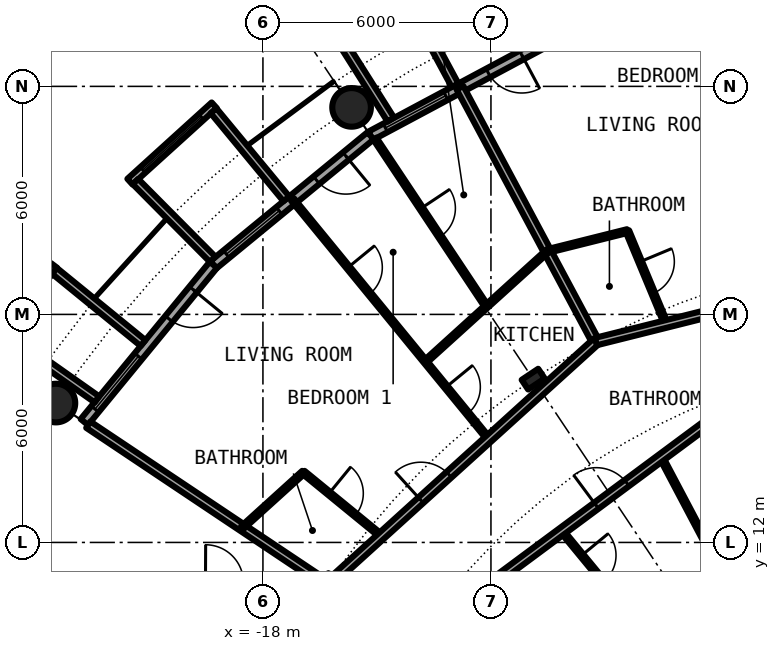
"""IFC4 building model, lengths in metres.
Left out: names, types, materials, properties, quantities, classifications, styles, units other than length and angle.
Written with IfcOpenShell. Run it as: python <this file> out.ifc"""

import sys

from ifc_helpers import new_model, si_unit, direction, frame, frame_2d, origin, origin_2d, place, context, subcontext, project, spatial, rectangle, circle, hollow_circle, i_section, extrude, element, fill, save


model = new_model("IFC4")
c1 = context("Model", 3, precision=1e-05, world=origin(), true_north=direction((0.0, 1.0)))
c2 = subcontext(c1, "Body", "Model", "MODEL_VIEW")
j1 = project(units=[si_unit("LENGTHUNIT", "METRE"), si_unit("PLANEANGLEUNIT", "RADIAN")], contexts=[c1])
p1 = place(None, origin())
s1 = spatial("IfcSite", under=j1, at=p1, CompositionType="ELEMENT")
p2 = place(p1, origin())
s2 = spatial("IfcBuilding", under=s1, at=p2, CompositionType="ELEMENT")
p3 = place(p2, frame((0.0, 0.0, 81.9)))
s3 = spatial("IfcBuildingStorey", under=s2, at=p3, CompositionType="ELEMENT", Elevation=81.9)
for number, where, z_axis, x_axis in (
    (1, (-15.667, 23.448, 0.0), (0.0, 0.0, 1.0), (1.0, 0.0, 0.0)),
    (2, (-23.448, 15.667, 0.0), (0.0, 0.0, 1.0), (1.0, 0.0, 0.0)),
):
    element("IfcColumn", number, at=place(p3, frame(where, z_axis=z_axis, x_axis=x_axis)), inside=s3, PredefinedType="COLUMN", context=c2, shape_type="SweptSolid", body=[
        extrude(hollow_circle(Radius=0.508, WallThickness=0.04, at=origin_2d()), origin(), (0.0, 0.0, 1.0), 3.05),
    ])
p4 = place(p3, frame((-10.889, 16.297, 0.0), z_axis=(0.0, 0.0, 1.0), x_axis=(-0.55557023302, 0.831469612303, 0.0)))
e3 = element("IfcColumn", 3, at=p4, inside=s3, PredefinedType="COLUMN", context=c2, shape_type="SweptSolid", body=[
    extrude(i_section(OverallWidth=0.306, OverallDepth=0.524, WebThickness=0.021, FlangeThickness=0.04, FilletRadius=0.027, at=origin_2d()), origin(), (0.0, 0.0, 1.0), 3.05),
])
p5 = place(p3, frame((-10.447, 25.222, 0.0), z_axis=(0.0, 0.0, 1.0), x_axis=(-0.881915646801, -0.471407246368, 0.0)))
e4 = element("IfcWall", 4, at=p5, inside=s3, PredefinedType="SOLIDWALL", context=c2, shape_type="SweptSolid", body=[
    extrude(rectangle(XDim=5.352, YDim=0.25, at=frame_2d((2.676, 0.0))), origin(), (0.0, 0.0, 1.0), 2.7),
])
p6 = place(p5, frame((0.841, 0.0, 0.0)))
e5 = element("IfcOpeningElement", 5, at=p6, cuts=e4, PredefinedType="OPENING", context=c2, shape_type="SweptSolid", body=[
    extrude(rectangle(XDim=1.0, YDim=2.2, at=frame_2d((0.5, 1.1))), frame((0.0, 0.135, 0.0), z_axis=(0.0, -1.0, 0.0), x_axis=(1.0, 0.0, 0.0)), (0.0, 0.0, 1.0), 0.27),
])
p7 = place(p5, frame((3.111, 0.0, 0.3)))
e6 = element("IfcOpeningElement", 6, at=p7, cuts=e4, PredefinedType="OPENING", context=c2, shape_type="SweptSolid", body=[
    extrude(rectangle(XDim=1.8, YDim=2.1, at=frame_2d((0.9, 1.05))), frame((0.0, 0.135, 0.0), z_axis=(0.0, -1.0, 0.0), x_axis=(1.0, 0.0, 0.0)), (0.0, 0.0, 1.0), 0.27),
])
p8 = place(p3, frame((-12.945, 24.029, -0.03), z_axis=(0.0, 0.0, 1.0), x_axis=(-0.474424310775, 0.88029629861, 0.0)))
e7 = element("IfcWall", 7, at=p8, inside=s3, PredefinedType="SOLIDWALL", context=c2, shape_type="SweptSolid", body=[
    extrude(rectangle(XDim=3.006, YDim=0.2, at=frame_2d((1.503, 0.0))), origin(), (0.0, 0.0, 1.0), 2.73),
])
p9 = place(p3, frame((-14.635, 23.126, -0.03), z_axis=(0.0, 0.0, 1.0), x_axis=(-0.534437802731, 0.845207805816, 0.0)))
e8 = element("IfcWall", 8, at=p9, inside=s3, PredefinedType="SOLIDWALL", context=c2, shape_type="SweptSolid", body=[
    extrude(rectangle(XDim=2.932, YDim=0.2, at=frame_2d((1.466, 0.0))), origin(), (0.0, 0.0, 1.0), 2.73),
])
p10 = place(p3, frame((-15.167, 22.699, 0.0), z_axis=(0.0, 0.0, 1.0), x_axis=(-0.773019449054, -0.634382322723, 0.0)))
e9 = element("IfcWall", 9, at=p10, inside=s3, PredefinedType="SOLIDWALL", context=c2, shape_type="SweptSolid", body=[
    extrude(rectangle(XDim=5.352, YDim=0.25, at=frame_2d((2.676, 0.0))), origin(), (0.0, 0.0, 1.0), 2.7),
])
p11 = place(p10, frame((0.841, 0.0, 0.0)))
e10 = element("IfcOpeningElement", 10, at=p11, cuts=e9, PredefinedType="OPENING", context=c2, shape_type="SweptSolid", body=[
    extrude(rectangle(XDim=1.0, YDim=2.2, at=frame_2d((0.5, 1.1))), frame((0.0, 0.135, 0.0), z_axis=(0.0, -1.0, 0.0), x_axis=(1.0, 0.0, 0.0)), (0.0, 0.0, 1.0), 0.27),
])
p12 = place(p10, frame((3.111, 0.0, 0.3)))
e11 = element("IfcOpeningElement", 11, at=p12, cuts=e9, PredefinedType="OPENING", context=c2, shape_type="SweptSolid", body=[
    extrude(rectangle(XDim=1.8, YDim=2.1, at=frame_2d((0.9, 1.05))), frame((0.0, 0.135, 0.0), z_axis=(0.0, -1.0, 0.0), x_axis=(1.0, 0.0, 0.0)), (0.0, 0.0, 1.0), 0.27),
])
p13 = place(p3, frame((-19.282, 23.503, -0.03), z_axis=(0.0, 0.0, 1.0), x_axis=(-0.740998365753, -0.671506829416, 0.0)))
e12 = element("IfcWall", 12, at=p13, inside=s3, PredefinedType="SOLIDWALL", context=c2, shape_type="SweptSolid", body=[
    extrude(rectangle(XDim=2.993, YDim=0.2, at=frame_2d((1.497, 0.0))), origin(), (0.0, 0.0, 1.0), 2.73),
])
p14 = place(p13, frame((0.457, 0.0, 0.33)))
e13 = element("IfcOpeningElement", 13, at=p14, cuts=e12, PredefinedType="OPENING", context=c2, shape_type="SweptSolid", body=[
    extrude(circle(Radius=1.04, at=frame_2d((1.04, 1.04))), frame((0.0, 0.11, 0.0), z_axis=(0.0, -1.0, 0.0), x_axis=(1.0, 0.0, 0.0)), (0.0, 0.0, 1.0), 0.22),
])
p15 = place(p3, frame((-17.384, 21.041, -0.03), z_axis=(0.0, 0.0, 1.0), x_axis=(-0.63709551667, 0.770784861449, 0.0)))
e14 = element("IfcWall", 14, at=p15, inside=s3, PredefinedType="SOLIDWALL", context=c2, shape_type="SweptSolid", body=[
    extrude(rectangle(XDim=3.006, YDim=0.2, at=frame_2d((1.503, 0.0))), origin(), (0.0, 0.0, 1.0), 2.73),
])
p16 = place(p3, frame((-19.323, 19.45, -0.03), z_axis=(0.0, 0.0, 1.0), x_axis=(-0.704476739375, 0.709727076896, 0.0)))
e15 = element("IfcWall", 15, at=p16, inside=s3, PredefinedType="SOLIDWALL", context=c2, shape_type="SweptSolid", body=[
    extrude(rectangle(XDim=2.883, YDim=0.2, at=frame_2d((1.441, 0.0))), origin(), (0.0, 0.0, 1.0), 2.73),
])
p17 = place(p3, frame((-19.304, 19.304, 0.0), z_axis=(0.0, 0.0, 1.0), x_axis=(-0.634382322723, -0.773019449054, 0.0)))
e16 = element("IfcWall", 16, at=p17, inside=s3, PredefinedType="SOLIDWALL", context=c2, shape_type="SweptSolid", body=[
    extrude(rectangle(XDim=5.352, YDim=0.25, at=frame_2d((2.676, 0.0))), origin(), (0.0, 0.0, 1.0), 2.7),
])
p18 = place(p17, frame((0.841, 0.0, 0.0)))
e17 = element("IfcOpeningElement", 17, at=p18, cuts=e16, PredefinedType="OPENING", context=c2, shape_type="SweptSolid", body=[
    extrude(rectangle(XDim=1.0, YDim=2.2, at=frame_2d((0.5, 1.1))), frame((0.0, 0.135, 0.0), z_axis=(0.0, -1.0, 0.0), x_axis=(1.0, 0.0, 0.0)), (0.0, 0.0, 1.0), 0.27),
])
p19 = place(p17, frame((3.111, 0.0, 0.3)))
e18 = element("IfcOpeningElement", 18, at=p19, cuts=e16, PredefinedType="OPENING", context=c2, shape_type="SweptSolid", body=[
    extrude(rectangle(XDim=1.8, YDim=2.1, at=frame_2d((0.9, 1.05))), frame((0.0, 0.135, 0.0), z_axis=(0.0, -1.0, 0.0), x_axis=(1.0, 0.0, 0.0)), (0.0, 0.0, 1.0), 0.27),
])
p20 = place(p3, frame((-23.497, 19.289, -0.03), z_axis=(0.0, 0.0, 1.0), x_axis=(-0.60418752353, -0.796842165306, 0.0)))
e19 = element("IfcWall", 19, at=p20, inside=s3, PredefinedType="SOLIDWALL", context=c2, shape_type="SweptSolid", body=[
    extrude(rectangle(XDim=2.337, YDim=0.2, at=frame_2d((1.168, 0.0))), origin(), (0.0, 0.0, 1.0), 2.73),
])
p21 = place(p20, frame((0.128, 0.0, 0.33)))
e20 = element("IfcOpeningElement", 20, at=p21, cuts=e19, PredefinedType="OPENING", context=c2, shape_type="SweptSolid", body=[
    extrude(circle(Radius=1.04, at=frame_2d((1.04, 1.04))), frame((0.0, 0.11, 0.0), z_axis=(0.0, -1.0, 0.0), x_axis=(1.0, 0.0, 0.0)), (0.0, 0.0, 1.0), 0.22),
])
p22 = place(p3, frame((-21.155, 17.246, -0.03), z_axis=(0.0, 0.0, 1.0), x_axis=(-0.775179004516, 0.631741648902, 0.0)))
e21 = element("IfcWall", 21, at=p22, inside=s3, PredefinedType="SOLIDWALL", context=c2, shape_type="SweptSolid", body=[
    extrude(rectangle(XDim=3.006, YDim=0.2, at=frame_2d((1.503, 0.0))), origin(), (0.0, 0.0, 1.0), 2.73),
])
p23 = place(p3, frame((-22.37, 15.765, -0.03), z_axis=(0.0, 0.0, 1.0), x_axis=(-0.817256123454, 0.576274612209, 0.0)))
e22 = element("IfcWall", 22, at=p23, inside=s3, PredefinedType="SOLIDWALL", context=c2, shape_type="SweptSolid", body=[
    extrude(rectangle(XDim=2.933, YDim=0.2, at=frame_2d((1.466, 0.0))), origin(), (0.0, 0.0, 1.0), 2.73),
])
p24 = place(p3, frame((-22.595, 15.098, 0.0), z_axis=(0.0, 0.0, 1.0), x_axis=(0.831382022135, -0.555701298605, 0.0)))
e23 = element("IfcWall", 23, at=p24, inside=s3, PredefinedType="PARTITIONING", context=c2, shape_type="SweptSolid", body=[
    extrude(rectangle(XDim=7.313, YDim=0.2, at=frame_2d((3.657, 0.0))), origin(), (0.0, 0.0, 1.0), 2.7),
])
p25 = place(p3, frame((-17.221, 21.022, 0.0), z_axis=(0.0, 0.0, 1.0), x_axis=(0.633735868108, -0.773549513266, 0.0)))
e24 = element("IfcWall", 24, at=p25, inside=s3, PredefinedType="PARTITIONING", context=c2, shape_type="SweptSolid", body=[
    extrude(rectangle(XDim=8.139, YDim=0.1, at=frame_2d((4.069, 0.0))), origin(), (0.0, 0.0, 1.0), 2.7),
])
p26 = place(p25, frame((6.378, 0.0, 0.0)))
e25 = element("IfcOpeningElement", 25, at=p26, cuts=e24, PredefinedType="OPENING", context=c2, shape_type="SweptSolid", body=[
    extrude(rectangle(XDim=0.9, YDim=2.3, at=frame_2d((0.45, 1.15))), frame((0.0, 0.06, 0.0), z_axis=(0.0, -1.0, 0.0), x_axis=(1.0, 0.0, 0.0)), (0.0, 0.0, 1.0), 0.12),
])
p27 = place(p25, frame((2.308, 0.0, 0.0)))
e26 = element("IfcOpeningElement", 26, at=p27, cuts=e24, PredefinedType="OPENING", context=c2, shape_type="SweptSolid", body=[
    extrude(rectangle(XDim=0.9, YDim=2.3, at=frame_2d((0.45, 1.15))), frame((0.0, 0.06, 0.0), z_axis=(0.0, -1.0, 0.0), x_axis=(1.0, 0.0, 0.0)), (0.0, 0.0, 1.0), 0.12),
])
p28 = place(p3, frame((-16.936, 13.845, 0.0), z_axis=(0.0, 0.0, 1.0), x_axis=(0.774162545943, -0.632986850147, 0.0)))
e27 = element("IfcWall", 27, at=p28, inside=s3, PredefinedType="PARTITIONING", context=c2, shape_type="SweptSolid", body=[
    extrude(rectangle(XDim=2.649, YDim=0.1, at=frame_2d((1.325, 0.0))), origin(), (0.0, 0.0, 1.0), 2.7),
])
p29 = place(p28, frame((0.875, 0.0, 0.0)))
e28 = element("IfcOpeningElement", 28, at=p29, cuts=e27, PredefinedType="OPENING", context=c2, shape_type="SweptSolid", body=[
    extrude(rectangle(XDim=0.9, YDim=2.3, at=frame_2d((0.45, 1.15))), frame((0.0, 0.06, 0.0), z_axis=(0.0, -1.0, 0.0), x_axis=(1.0, 0.0, 0.0)), (0.0, 0.0, 1.0), 0.12),
])
p30 = place(p3, frame((-15.054, 22.624, 0.0), z_axis=(0.0, 0.0, 1.0), x_axis=(0.553913391217, -0.832574294, 0.0)))
e29 = element("IfcWall", 29, at=p30, inside=s3, PredefinedType="PARTITIONING", context=c2, shape_type="SweptSolid", body=[
    extrude(rectangle(XDim=5.301, YDim=0.1, at=frame_2d((2.65, 0.0))), origin(), (0.0, 0.0, 1.0), 2.7),
])
p31 = place(p30, frame((2.2, 0.0, 0.0)))
e30 = element("IfcOpeningElement", 30, at=p31, cuts=e29, PredefinedType="OPENING", context=c2, shape_type="SweptSolid", body=[
    extrude(rectangle(XDim=0.9, YDim=2.3, at=frame_2d((0.45, 1.15))), frame((0.0, 0.06, 0.0), z_axis=(0.0, -1.0, 0.0), x_axis=(1.0, 0.0, 0.0)), (0.0, 0.0, 1.0), 0.12),
])
p32 = place(p3, frame((-12.815, 23.963, 0.0), z_axis=(0.0, 0.0, 1.0), x_axis=(0.471506520577, -0.881862574925, 0.0)))
e31 = element("IfcWall", 31, at=p32, inside=s3, PredefinedType="PARTITIONING", context=c2, shape_type="SweptSolid", body=[
    extrude(rectangle(XDim=7.574, YDim=0.2, at=frame_2d((3.787, 0.0))), origin(), (0.0, 0.0, 1.0), 2.7),
])
p33 = place(p3, frame((-10.132, 12.296, 0.0), z_axis=(0.0, 0.0, 1.0), x_axis=(0.635976043025, -0.771708800454, 0.0)))
e32 = element("IfcWall", 32, at=p33, inside=s3, PredefinedType="PARTITIONING", context=c2, shape_type="SweptSolid", body=[
    extrude(rectangle(XDim=8.213, YDim=0.1, at=frame_2d((4.106, 0.0))), origin(), (0.0, 0.0, 1.0), 2.7),
])
p34 = place(p33, frame((0.823, 0.0, 0.0)))
e33 = element("IfcOpeningElement", 33, at=p34, cuts=e32, PredefinedType="OPENING", context=c2, shape_type="SweptSolid", body=[
    extrude(rectangle(XDim=0.9, YDim=2.3, at=frame_2d((0.45, 1.15))), frame((0.0, 0.06, 0.0), z_axis=(0.0, -1.0, 0.0), x_axis=(1.0, 0.0, 0.0)), (0.0, 0.0, 1.0), 0.12),
])
p35 = place(p33, frame((4.929, 0.0, 0.0)))
e34 = element("IfcOpeningElement", 34, at=p35, cuts=e32, PredefinedType="OPENING", context=c2, shape_type="SweptSolid", body=[
    extrude(rectangle(XDim=0.9, YDim=2.3, at=frame_2d((0.45, 1.15))), frame((0.0, 0.06, 0.0), z_axis=(0.0, -1.0, 0.0), x_axis=(1.0, 0.0, 0.0)), (0.0, 0.0, 1.0), 0.12),
])
p36 = place(p3, frame((-8.41, 20.193, 0.0), z_axis=(0.0, 0.0, 1.0), x_axis=(0.384438589316, -0.923150567917, 0.0)))
e35 = element("IfcWall", 35, at=p36, inside=s3, PredefinedType="PARTITIONING", context=c2, shape_type="SweptSolid", body=[
    extrude(rectangle(XDim=2.647, YDim=0.1, at=frame_2d((1.324, 0.0))), origin(), (0.0, 0.0, 1.0), 2.7),
])
p37 = place(p36, frame((0.874, 0.0, 0.0)))
e36 = element("IfcOpeningElement", 36, at=p37, cuts=e35, PredefinedType="OPENING", context=c2, shape_type="SweptSolid", body=[
    extrude(rectangle(XDim=0.9, YDim=2.3, at=frame_2d((0.45, 1.15))), frame((0.0, 0.06, 0.0), z_axis=(0.0, -1.0, 0.0), x_axis=(1.0, 0.0, 0.0)), (0.0, 0.0, 1.0), 0.12),
])
p38 = place(p3, frame((-7.519, 14.234, 0.0), z_axis=(0.0, 0.0, 1.0), x_axis=(0.467001992543, -0.884256263173, 0.0)))
e37 = element("IfcWall", 37, at=p38, inside=s3, PredefinedType="PARTITIONING", context=c2, shape_type="SweptSolid", body=[
    extrude(rectangle(XDim=2.572, YDim=0.1, at=frame_2d((1.286, 0.0))), origin(), (0.0, 0.0, 1.0), 2.7),
])
p39 = place(p3, frame((-14.052, 9.389, 0.0), z_axis=(0.0, 0.0, 1.0), x_axis=(0.803204584823, 0.59570327758, 0.0)))
e38 = element("IfcWall", 38, at=p39, inside=s3, PredefinedType="PARTITIONING", context=c2, shape_type="SweptSolid", body=[
    extrude(rectangle(XDim=11.387, YDim=0.2, at=frame_2d((5.693, 0.0))), origin(), (0.0, 0.0, 1.0), 2.7),
])
p40 = place(p39, frame((6.007, 0.0, 0.0)))
e39 = element("IfcOpeningElement", 39, at=p40, cuts=e38, PredefinedType="OPENING", context=c2, shape_type="SweptSolid", body=[
    extrude(rectangle(XDim=1.0, YDim=2.3, at=frame_2d((0.5, 1.15))), frame((0.0, 0.11, 0.0), z_axis=(0.0, -1.0, 0.0), x_axis=(1.0, 0.0, 0.0)), (0.0, 0.0, 1.0), 0.22),
])
p41 = place(p3, frame((-16.18, 10.995, 0.0), z_axis=(0.0, 0.0, 1.0), x_axis=(0.741086986457, 0.671409024741, 0.0)))
e40 = element("IfcWall", 40, at=p41, inside=s3, PredefinedType="PARTITIONING", context=c2, shape_type="SweptSolid", body=[
    extrude(rectangle(XDim=9.373, YDim=0.2, at=frame_2d((4.687, 0.0))), origin(), (0.0, 0.0, 1.0), 2.38),
])
p42 = place(p41, frame((3.152, 0.0, 0.0)))
e41 = element("IfcOpeningElement", 41, at=p42, cuts=e40, PredefinedType="OPENING", context=c2, shape_type="SweptSolid", body=[
    extrude(rectangle(XDim=1.0, YDim=2.3, at=frame_2d((0.5, 1.15))), frame((0.0, 0.11, 0.0), z_axis=(0.0, -1.0, 0.0), x_axis=(1.0, 0.0, 0.0)), (0.0, 0.0, 1.0), 0.22),
])
p43 = place(p3, frame((-9.239, 17.285, 0.0), z_axis=(0.0, 0.0, 1.0), x_axis=(0.970008158324, 0.243072361213, 0.0)))
e42 = element("IfcWall", 42, at=p43, inside=s3, PredefinedType="PARTITIONING", context=c2, shape_type="SweptSolid", body=[
    extrude(rectangle(XDim=9.525, YDim=0.2, at=frame_2d((4.762, 0.0))), origin(), (0.0, 0.0, 1.0), 2.38),
])
p44 = place(p43, frame((3.305, 0.0, 0.0)))
e43 = element("IfcOpeningElement", 43, at=p44, cuts=e42, PredefinedType="OPENING", context=c2, shape_type="SweptSolid", body=[
    extrude(rectangle(XDim=1.0, YDim=2.3, at=frame_2d((0.5, 1.15))), frame((0.0, 0.11, 0.0), z_axis=(0.0, -1.0, 0.0), x_axis=(1.0, 0.0, 0.0)), (0.0, 0.0, 1.0), 0.22),
])
p45 = place(p3, frame((-18.54, 12.392, 0.0), z_axis=(0.0, 0.0, 1.0), x_axis=(0.741319612235, 0.671152167929, 0.0)))
e44 = element("IfcWall", 44, at=p45, inside=s3, PredefinedType="PARTITIONING", context=c2, shape_type="SweptSolid", body=[
    extrude(rectangle(XDim=2.168, YDim=0.1, at=frame_2d((1.084, 0.0))), origin(), (0.0, 0.0, 1.0), 2.7),
])
p46 = place(p3, frame((-13.727, 16.754, 0.0), z_axis=(0.0, 0.0, 1.0), x_axis=(0.741134692738, 0.671356363804, 0.0)))
e45 = element("IfcWall", 45, at=p46, inside=s3, PredefinedType="PARTITIONING", context=c2, shape_type="SweptSolid", body=[
    extrude(rectangle(XDim=4.342, YDim=0.1, at=frame_2d((2.171, 0.0))), origin(), (0.0, 0.0, 1.0), 2.7),
])
p47 = place(p3, frame((-10.512, 19.667, 0.0), z_axis=(0.0, 0.0, 1.0), x_axis=(0.970076188308, 0.242800718444, 0.0)))
e46 = element("IfcWall", 46, at=p47, inside=s3, PredefinedType="PARTITIONING", context=c2, shape_type="SweptSolid", body=[
    extrude(rectangle(XDim=2.167, YDim=0.1, at=frame_2d((1.083, 0.0))), origin(), (0.0, 0.0, 1.0), 2.7),
])
p48 = place(p6, origin())
e47 = element("IfcDoor", 47, at=p48, inside=s3, OperationType="SINGLE_SWING_LEFT", PredefinedType="DOOR", context=c2, shape_type="SweptSolid", body=[
    extrude(rectangle(XDim=1.0, YDim=2.2, at=frame_2d((0.5, 1.1))), frame((0.0, 0.025, 0.0), z_axis=(0.0, -1.0, 0.0), x_axis=(1.0, 0.0, 0.0)), (0.0, 0.0, 1.0), 0.05),
])
fill(e5, e47)
p49 = place(p7, origin())
e48 = element("IfcWindow", 48, at=p49, inside=s3, PartitioningType="SINGLE_PANEL", PredefinedType="WINDOW", context=c2, shape_type="SweptSolid", body=[
    extrude(rectangle(XDim=1.8, YDim=2.1, at=frame_2d((0.9, 1.05))), frame((0.0, 0.03, 0.0), z_axis=(0.0, -1.0, 0.0), x_axis=(1.0, 0.0, 0.0)), (0.0, 0.0, 1.0), 0.06),
])
fill(e6, e48)
p50 = place(p11, origin())
e49 = element("IfcDoor", 49, at=p50, inside=s3, OperationType="SINGLE_SWING_LEFT", PredefinedType="DOOR", context=c2, shape_type="SweptSolid", body=[
    extrude(rectangle(XDim=1.0, YDim=2.2, at=frame_2d((0.5, 1.1))), frame((0.0, 0.025, 0.0), z_axis=(0.0, -1.0, 0.0), x_axis=(1.0, 0.0, 0.0)), (0.0, 0.0, 1.0), 0.05),
])
fill(e10, e49)
p51 = place(p12, origin())
e50 = element("IfcWindow", 50, at=p51, inside=s3, PartitioningType="SINGLE_PANEL", PredefinedType="WINDOW", context=c2, shape_type="SweptSolid", body=[
    extrude(rectangle(XDim=1.8, YDim=2.1, at=frame_2d((0.9, 1.05))), frame((0.0, 0.03, 0.0), z_axis=(0.0, -1.0, 0.0), x_axis=(1.0, 0.0, 0.0)), (0.0, 0.0, 1.0), 0.06),
])
fill(e11, e50)
p52 = place(p14, origin())
e51 = element("IfcWindow", 51, at=p52, inside=s3, PartitioningType="SINGLE_PANEL", PredefinedType="WINDOW", context=c2, shape_type="SweptSolid", body=[
    extrude(circle(Radius=1.04, at=frame_2d((1.04, 1.04))), frame((0.0, 0.03, 0.0), z_axis=(0.0, -1.0, 0.0), x_axis=(1.0, 0.0, 0.0)), (0.0, 0.0, 1.0), 0.06),
])
fill(e13, e51)
p53 = place(p18, origin())
e52 = element("IfcDoor", 52, at=p53, inside=s3, OperationType="SINGLE_SWING_LEFT", PredefinedType="DOOR", context=c2, shape_type="SweptSolid", body=[
    extrude(rectangle(XDim=1.0, YDim=2.2, at=frame_2d((0.5, 1.1))), frame((0.0, 0.025, 0.0), z_axis=(0.0, -1.0, 0.0), x_axis=(1.0, 0.0, 0.0)), (0.0, 0.0, 1.0), 0.05),
])
fill(e17, e52)
p54 = place(p19, origin())
e53 = element("IfcWindow", 53, at=p54, inside=s3, PartitioningType="SINGLE_PANEL", PredefinedType="WINDOW", context=c2, shape_type="SweptSolid", body=[
    extrude(rectangle(XDim=1.8, YDim=2.1, at=frame_2d((0.9, 1.05))), frame((0.0, 0.03, 0.0), z_axis=(0.0, -1.0, 0.0), x_axis=(1.0, 0.0, 0.0)), (0.0, 0.0, 1.0), 0.06),
])
fill(e18, e53)
p55 = place(p37, origin())
e54 = element("IfcDoor", 54, at=p55, inside=s3, OperationType="SINGLE_SWING_RIGHT", PredefinedType="DOOR", context=c2, shape_type="SweptSolid", body=[
    extrude(rectangle(XDim=0.9, YDim=2.3, at=frame_2d((0.45, 1.15))), frame((0.0, 0.025, 0.0), z_axis=(0.0, -1.0, 0.0), x_axis=(1.0, 0.0, 0.0)), (0.0, 0.0, 1.0), 0.05),
])
fill(e36, e54)
p56 = place(p42, origin())
e55 = element("IfcDoor", 55, at=p56, inside=s3, OperationType="SINGLE_SWING_LEFT", PredefinedType="DOOR", context=c2, shape_type="SweptSolid", body=[
    extrude(rectangle(XDim=1.0, YDim=2.3, at=frame_2d((0.5, 1.15))), frame((0.0, 0.025, 0.0), z_axis=(0.0, -1.0, 0.0), x_axis=(1.0, 0.0, 0.0)), (0.0, 0.0, 1.0), 0.05),
])
fill(e41, e55)
p57 = place(p29, origin())
e56 = element("IfcDoor", 56, at=p57, inside=s3, OperationType="SINGLE_SWING_LEFT", PredefinedType="DOOR", context=c2, shape_type="SweptSolid", body=[
    extrude(rectangle(XDim=0.9, YDim=2.3, at=frame_2d((0.45, 1.15))), frame((0.0, 0.025, 0.0), z_axis=(0.0, -1.0, 0.0), x_axis=(1.0, 0.0, 0.0)), (0.0, 0.0, 1.0), 0.05),
])
fill(e28, e56)
p58 = place(p26, origin())
e57 = element("IfcDoor", 57, at=p58, inside=s3, OperationType="SINGLE_SWING_RIGHT", PredefinedType="DOOR", context=c2, shape_type="SweptSolid", body=[
    extrude(rectangle(XDim=0.9, YDim=2.3, at=frame_2d((0.45, 1.15))), frame((0.0, 0.025, 0.0), z_axis=(0.0, -1.0, 0.0), x_axis=(1.0, 0.0, 0.0)), (0.0, 0.0, 1.0), 0.05),
])
fill(e25, e57)
p59 = place(p27, origin())
e58 = element("IfcDoor", 58, at=p59, inside=s3, OperationType="SINGLE_SWING_LEFT", PredefinedType="DOOR", context=c2, shape_type="SweptSolid", body=[
    extrude(rectangle(XDim=0.9, YDim=2.3, at=frame_2d((0.45, 1.15))), frame((0.0, 0.025, 0.0), z_axis=(0.0, -1.0, 0.0), x_axis=(1.0, 0.0, 0.0)), (0.0, 0.0, 1.0), 0.05),
])
fill(e26, e58)
p60 = place(p31, origin())
e59 = element("IfcDoor", 59, at=p60, inside=s3, OperationType="SINGLE_SWING_LEFT", PredefinedType="DOOR", context=c2, shape_type="SweptSolid", body=[
    extrude(rectangle(XDim=0.9, YDim=2.3, at=frame_2d((0.45, 1.15))), frame((0.0, 0.025, 0.0), z_axis=(0.0, -1.0, 0.0), x_axis=(1.0, 0.0, 0.0)), (0.0, 0.0, 1.0), 0.05),
])
fill(e30, e59)
p61 = place(p40, origin())
e60 = element("IfcDoor", 60, at=p61, inside=s3, OperationType="SINGLE_SWING_RIGHT", PredefinedType="DOOR", context=c2, shape_type="SweptSolid", body=[
    extrude(rectangle(XDim=1.0, YDim=2.3, at=frame_2d((0.5, 1.15))), frame((0.0, 0.025, 0.0), z_axis=(0.0, -1.0, 0.0), x_axis=(1.0, 0.0, 0.0)), (0.0, 0.0, 1.0), 0.05),
])
fill(e39, e60)
p62 = place(p34, origin())
e61 = element("IfcDoor", 61, at=p62, inside=s3, OperationType="SINGLE_SWING_LEFT", PredefinedType="DOOR", context=c2, shape_type="SweptSolid", body=[
    extrude(rectangle(XDim=0.9, YDim=2.3, at=frame_2d((0.45, 1.15))), frame((0.0, 0.025, 0.0), z_axis=(0.0, -1.0, 0.0), x_axis=(1.0, 0.0, 0.0)), (0.0, 0.0, 1.0), 0.05),
])
fill(e33, e61)
save(model, sys.argv[1])
